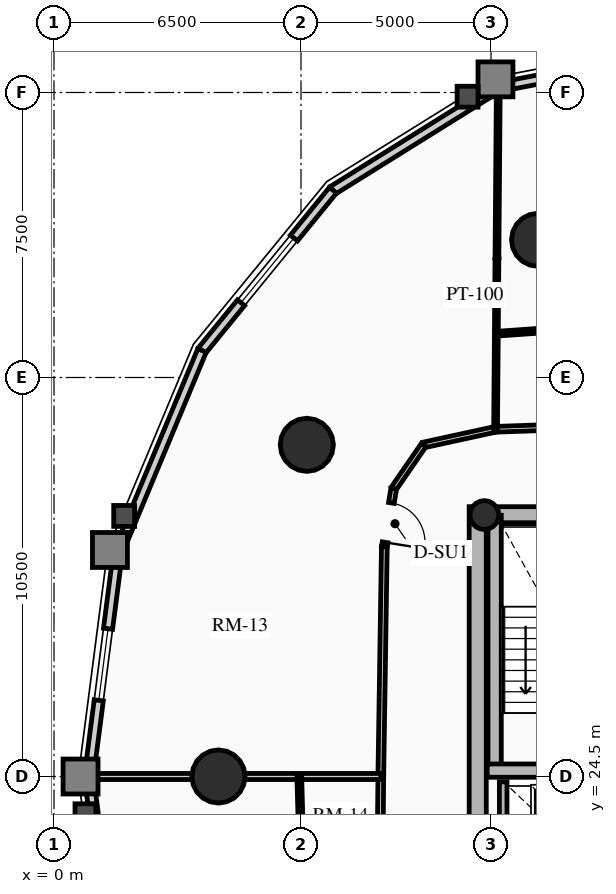
"""IFC4 building model, lengths in metres.
Left out: names, types, materials, properties, quantities, classifications, styles, units other than length and angle.
Written with IfcOpenShell. Run it as: python <this file> out.ifc"""

import sys

from ifc_helpers import new_model, si_unit, direction, frame, frame_2d, origin, origin_2d, place, context, subcontext, project, spatial, rectangle, circle, hollow_circle, extrude, source, transform, mapped, element, fill, save


model = new_model("IFC4")
c1 = context("Model", 3, precision=1e-05, world=origin(), true_north=direction((0.0, 1.0)))
c2 = subcontext(c1, "Body", "Model", "MODEL_VIEW")
j1 = project(units=[si_unit("LENGTHUNIT", "METRE"), si_unit("PLANEANGLEUNIT", "RADIAN")], contexts=[c1])
p1 = place(None, origin())
s1 = spatial("IfcSite", under=j1, at=p1, CompositionType="ELEMENT")
p2 = place(p1, origin())
s2 = spatial("IfcBuilding", under=s1, at=p2, CompositionType="ELEMENT")
p3 = place(p2, frame((0.0, 0.0, 129.16)))
s3 = spatial("IfcBuildingStorey", under=s2, at=p3, CompositionType="ELEMENT", Elevation=129.16)
p4 = place(p3, frame((11.15, 17.4, 0.0), z_axis=(0.0, 0.0, 1.0), x_axis=(0.0, 1.0, 0.0)))
e1 = element("IfcWall", 1, at=p4, inside=s3, PredefinedType="SHEAR", context=c2, shape_type="SweptSolid", body=[
    extrude(rectangle(XDim=14.2, YDim=0.45, at=frame_2d((7.1, 0.0))), origin(), (0.0, 0.0, 1.0), 3.72),
])
p5 = place(p3, frame((11.15, 31.375, 0.0), z_axis=(0.0, 0.0, 1.0), x_axis=(1.0, 0.0, 0.0)))
e2 = element("IfcWall", 2, at=p5, inside=s3, PredefinedType="SHEAR", context=c2, shape_type="SweptSolid", body=[
    extrude(rectangle(XDim=10.7, YDim=0.45, at=frame_2d((5.35, 0.0))), origin(), (0.0, 0.0, 1.0), 3.72),
])
m1 = source(origin(), c2, "Body", "SweptSolid", [
    extrude(rectangle(XDim=1.5, YDim=2.02, at=frame_2d((0.75, 1.01))), frame((0.0, 0.235, 0.0), z_axis=(0.0, -1.0, 0.0), x_axis=(1.0, 0.0, 0.0)), (0.0, 0.0, 1.0), 0.47),
])
p6 = place(p5, frame((4.6, 0.0, 0.0)))
e3 = element("IfcOpeningElement", 3, at=p6, cuts=e2, PredefinedType="OPENING", context=c2, shape_type="MappedRepresentation", body=[
    mapped(m1, transform((0.0, 0.0, 0.0), x_axis=(1.0, 0.0, 0.0), y_axis=(0.0, 1.0, 0.0), z_axis=(0.0, 0.0, 1.0), scale=1.0)),
])
p7 = place(p3, frame((11.595, 24.655, 0.0), z_axis=(0.0, 0.0, 1.0), x_axis=(0.0, 1.0, 0.0)))
e4 = element("IfcWall", 4, at=p7, inside=s3, PredefinedType="SHEAR", context=c2, shape_type="SweptSolid", body=[
    extrude(rectangle(XDim=6.72, YDim=0.35, at=frame_2d((3.36, 0.0))), origin(), (0.0, 0.0, 1.0), 3.72),
])
p8 = place(p3, frame((11.4, 24.655, 0.0), z_axis=(0.0, 0.0, 1.0), x_axis=(1.0, 0.0, 0.0)))
e5 = element("IfcWall", 5, at=p8, inside=s3, PredefinedType="SHEAR", context=c2, shape_type="SweptSolid", body=[
    extrude(rectangle(XDim=3.285, YDim=0.35, at=frame_2d((1.643, 0.0))), origin(), (0.0, 0.0, 1.0), 3.72),
])
p9 = place(p3, frame((11.325, 31.38, 0.0), z_axis=(0.0, 0.0, 1.0), x_axis=(1.0, 0.0, 0.0)))
e6 = element("IfcColumn", 6, at=p9, inside=s3, PredefinedType="COLUMN", context=c2, shape_type="SweptSolid", body=[
    extrude(hollow_circle(Radius=0.38, WallThickness=0.032, at=origin_2d()), origin(), (0.0, 0.0, 1.0), 3.72),
])
for number, where, z_axis, x_axis in (
    (7, (12.739, 38.623, 0.0), (0.0, 0.0, 1.0), (1.0, 0.0, 0.0)),
    (8, (6.653, 33.229, 0.0), (0.0, 0.0, 1.0), (1.0, 0.0, 0.0)),
    (9, (4.328, 24.5, 0.0), (0.0, 0.0, 1.0), (1.0, 0.0, 0.0)),
):
    element("IfcColumn", number, at=place(p3, frame(where, z_axis=z_axis, x_axis=x_axis)), inside=s3, PredefinedType="USERDEFINED", context=c2, shape_type="SweptSolid", body=[
        extrude(circle(Radius=0.7, at=origin_2d()), origin(), (0.0, 0.0, 1.0), 3.72),
    ])
p10 = place(p3, frame((11.685, 42.637, 0.0), z_axis=(0.0, 0.0, 1.0), x_axis=(0.981723785992, 0.190311344954, 0.0)))
e10 = element("IfcWall", 10, at=p10, inside=s3, PredefinedType="SOLIDWALL", context=c2, shape_type="SweptSolid", body=[
    extrude(rectangle(XDim=4.904, YDim=0.24, at=frame_2d((2.452, 0.0))), origin(), (0.0, 0.0, 1.0), 2.949),
])
m2 = source(origin(), c2, "Body", "SweptSolid", [
    extrude(rectangle(XDim=1.9, YDim=1.35, at=frame_2d((0.95, 0.675))), frame((0.0, 0.13, 0.0), z_axis=(0.0, -1.0, 0.0), x_axis=(1.0, 0.0, 0.0)), (0.0, 0.0, 1.0), 0.26),
])
p11 = place(p10, frame((1.502, 0.0, 0.65)))
e11 = element("IfcOpeningElement", 11, at=p11, cuts=e10, PredefinedType="OPENING", context=c2, shape_type="MappedRepresentation", body=[
    mapped(m2, transform((0.0, 0.0, 0.0), x_axis=(1.0, 0.0, 0.0), y_axis=(0.0, 1.0, 0.0), z_axis=(0.0, 0.0, 1.0), scale=1.0)),
])
p12 = place(p3, frame((7.342, 39.928, 0.0), z_axis=(0.0, 0.0, 1.0), x_axis=(0.848520380187, 0.529162701263, 0.0)))
e12 = element("IfcWall", 12, at=p12, inside=s3, PredefinedType="SOLIDWALL", context=c2, shape_type="SweptSolid", body=[
    extrude(rectangle(XDim=5.119, YDim=0.24, at=frame_2d((2.56, 0.0))), origin(), (0.0, 0.0, 1.0), 2.949),
])
p13 = place(p3, frame((3.895, 35.709, 0.0), z_axis=(0.0, 0.0, 1.0), x_axis=(0.632700781152, 0.77439635945, 0.0)))
e13 = element("IfcWall", 13, at=p13, inside=s3, PredefinedType="SOLIDWALL", context=c2, shape_type="SweptSolid", body=[
    extrude(rectangle(XDim=5.448, YDim=0.24, at=frame_2d((2.724, 0.0))), origin(), (0.0, 0.0, 1.0), 2.949),
])
m3 = source(origin(), c2, "Body", "SweptSolid", [
    extrude(rectangle(XDim=2.2, YDim=1.35, at=frame_2d((1.1, 0.675))), frame((0.0, 0.13, 0.0), z_axis=(0.0, -1.0, 0.0), x_axis=(1.0, 0.0, 0.0)), (0.0, 0.0, 1.0), 0.26),
])
p14 = place(p13, frame((1.624, 0.0, 0.65)))
e14 = element("IfcOpeningElement", 14, at=p14, cuts=e13, PredefinedType="OPENING", context=c2, shape_type="MappedRepresentation", body=[
    mapped(m3, transform((0.0, 0.0, 0.0), x_axis=(1.0, 0.0, 0.0), y_axis=(0.0, 1.0, 0.0), z_axis=(0.0, 0.0, 1.0), scale=1.0)),
])
p15 = place(p3, frame((1.682, 30.393, 0.0), z_axis=(0.0, 0.0, 1.0), x_axis=(0.384344417632, 0.923189779317, 0.0)))
e15 = element("IfcWall", 15, at=p15, inside=s3, PredefinedType="SOLIDWALL", context=c2, shape_type="SweptSolid", body=[
    extrude(rectangle(XDim=5.758, YDim=0.24, at=frame_2d((2.879, 0.0))), origin(), (0.0, 0.0, 1.0), 2.949),
])
p16 = place(p3, frame((0.919, 24.5, 0.0), z_axis=(0.0, 0.0, 1.0), x_axis=(0.128351991996, 0.991728675672, 0.0)))
e16 = element("IfcWall", 16, at=p16, inside=s3, PredefinedType="SOLIDWALL", context=c2, shape_type="SweptSolid", body=[
    extrude(rectangle(XDim=5.942, YDim=0.24, at=frame_2d((2.971, 0.0))), origin(), (0.0, 0.0, 1.0), 2.949),
])
p17 = place(p16, frame((2.021, 0.0, 0.65)))
e17 = element("IfcOpeningElement", 17, at=p17, cuts=e16, PredefinedType="OPENING", context=c2, shape_type="MappedRepresentation", body=[
    mapped(m2, transform((0.0, 0.0, 0.0), x_axis=(1.0, 0.0, 0.0), y_axis=(0.0, 1.0, 0.0), z_axis=(0.0, 0.0, 1.0), scale=1.0)),
])
p18 = place(p3, frame((1.682, 18.607, 0.0), z_axis=(0.0, 0.0, 1.0), x_axis=(-0.128351991996, 0.991728675672, 0.0)))
e18 = element("IfcWall", 18, at=p18, inside=s3, PredefinedType="SOLIDWALL", context=c2, shape_type="SweptSolid", body=[
    extrude(rectangle(XDim=5.942, YDim=0.24, at=frame_2d((2.971, 0.0))), origin(), (0.0, 0.0, 1.0), 2.949),
])
p19 = place(p3, frame((11.82, 21.92, 0.0), z_axis=(0.0, 0.0, 1.0), x_axis=(0.0, 1.0, 0.0)))
e19 = element("IfcWall", 19, at=p19, inside=s3, PredefinedType="SHEAR", context=c2, shape_type="SweptSolid", body=[
    extrude(rectangle(XDim=2.44, YDim=0.2, at=frame_2d((1.22, 0.0))), origin(), (0.0, 0.0, 1.0), 3.72),
])
p20 = place(p3, frame((18.143, 33.86, 0.0), z_axis=(0.0, 0.0, 1.0), x_axis=(-0.999419208319, -0.034077060363, 0.0)))
e20 = element("IfcWall", 20, at=p20, inside=s3, PredefinedType="PARTITIONING", context=c2, shape_type="SweptSolid", body=[
    extrude(rectangle(XDim=6.527, YDim=0.15, at=frame_2d((3.263, 0.0))), origin(), (0.0, 0.0, 1.0), 2.995),
])
p21 = place(p3, frame((11.62, 33.637, 0.0), z_axis=(0.0, 0.0, 1.0), x_axis=(-0.97702579435, -0.213121085711, 0.0)))
e21 = element("IfcWall", 21, at=p21, inside=s3, PredefinedType="PARTITIONING", context=c2, shape_type="SweptSolid", body=[
    extrude(rectangle(XDim=1.935, YDim=0.15, at=frame_2d((0.967, 0.0))), origin(), (0.0, 0.0, 1.0), 2.995),
])
p22 = place(p3, frame((9.729, 33.225, 0.0), z_axis=(0.0, 0.0, 1.0), x_axis=(-0.567183649484, -0.82359134755, 0.0)))
e22 = element("IfcWall", 22, at=p22, inside=s3, PredefinedType="PARTITIONING", context=c2, shape_type="SweptSolid", body=[
    extrude(rectangle(XDim=1.392, YDim=0.15, at=frame_2d((0.696, 0.0))), origin(), (0.0, 0.0, 1.0), 2.995),
])
p23 = place(p3, frame((8.94, 32.078, 0.0), z_axis=(0.0, 0.0, 1.0), x_axis=(-0.159148467753, -0.98725466077, 0.0)))
e23 = element("IfcWall", 23, at=p23, inside=s3, PredefinedType="PARTITIONING", context=c2, shape_type="SweptSolid", body=[
    extrude(rectangle(XDim=1.554, YDim=0.15, at=frame_2d((0.777, 0.0))), origin(), (0.0, 0.0, 1.0), 2.995),
])
m4 = source(origin(), c2, "Body", "SweptSolid", [
    extrude(rectangle(XDim=1.05, YDim=2.015, at=frame_2d((0.525, 1.007))), frame((0.0, 0.085, 0.0), z_axis=(0.0, -1.0, 0.0), x_axis=(1.0, 0.0, 0.0)), (0.0, 0.0, 1.0), 0.17),
])
p24 = place(p23, frame((0.384, 0.0, 0.0)))
e24 = element("IfcOpeningElement", 24, at=p24, cuts=e23, PredefinedType="OPENING", context=c2, shape_type="MappedRepresentation", body=[
    mapped(m4, transform((0.0, 0.0, 0.0), x_axis=(1.0, 0.0, 0.0), y_axis=(0.0, 1.0, 0.0), z_axis=(0.0, 0.0, 1.0), scale=1.0)),
])
p25 = place(p3, frame((8.693, 30.544, 0.0), z_axis=(0.0, 0.0, 1.0), x_axis=(-0.015307007986, -0.99988284089, 0.0)))
e25 = element("IfcWall", 25, at=p25, inside=s3, PredefinedType="PARTITIONING", context=c2, shape_type="SweptSolid", body=[
    extrude(rectangle(XDim=6.045, YDim=0.15, at=frame_2d((3.022, 0.0))), origin(), (0.0, 0.0, 1.0), 3.425),
])
p26 = place(p3, frame((8.6, 24.5, 0.0), z_axis=(0.0, 0.0, 1.0), x_axis=(-0.010023665349, -0.999949761805, 0.0)))
e26 = element("IfcWall", 26, at=p26, inside=s3, PredefinedType="PARTITIONING", context=c2, shape_type="SweptSolid", body=[
    extrude(rectangle(XDim=6.162, YDim=0.15, at=frame_2d((3.081, 0.0))), origin(), (0.0, 0.0, 1.0), 2.995),
])
p27 = place(p3, frame((11.62, 33.637, 0.0), z_axis=(0.0, 0.0, 1.0), x_axis=(0.007965167065, 0.999968277554, 0.0)))
e27 = element("IfcWall", 27, at=p27, inside=s3, PredefinedType="MOVABLE", context=c2, shape_type="SweptSolid", body=[
    extrude(rectangle(XDim=8.981, YDim=0.1, at=frame_2d((4.49, 0.0))), origin(), (0.0, 0.0, 1.0), 2.949),
])
p28 = place(p3, frame((8.6, 24.5, 0.0), z_axis=(0.0, 0.0, 1.0), x_axis=(-1.0, 0.0, 0.0)))
e28 = element("IfcWall", 28, at=p28, inside=s3, PredefinedType="PARTITIONING", context=c2, shape_type="SweptSolid", body=[
    extrude(rectangle(XDim=7.661, YDim=0.16, at=frame_2d((3.831, 0.0))), origin(), (0.0, 0.0, 1.0), 2.949),
])
p29 = place(p3, frame((17.683, 36.573, 0.0), z_axis=(0.0, 0.0, 1.0), x_axis=(-0.997580369038, -0.069522710754, 0.0)))
e29 = element("IfcWall", 29, at=p29, inside=s3, PredefinedType="PARTITIONING", context=c2, shape_type="SweptSolid", body=[
    extrude(rectangle(XDim=6.058, YDim=0.125, at=frame_2d((3.029, 0.0))), origin(), (0.0, 0.0, 1.0), 2.995),
])
p30 = place(p3, frame((6.455, 24.5, 0.0), z_axis=(0.0, 0.0, 1.0), x_axis=(0.027753708707, -0.999614791634, 0.0)))
e30 = element("IfcWall", 30, at=p30, inside=s3, PredefinedType="PARTITIONING", context=c2, shape_type="SweptSolid", body=[
    extrude(rectangle(XDim=6.087, YDim=0.125, at=frame_2d((3.044, 0.0))), origin(), (0.0, 0.0, 1.0), 2.995),
])
m5 = source(origin(), c2, "Body", "SweptSolid", [
    extrude(rectangle(XDim=0.9, YDim=2.005, at=frame_2d((0.45, 1.002))), frame((0.0, 0.073, 0.0), z_axis=(0.0, -1.0, 0.0), x_axis=(1.0, 0.0, 0.0)), (0.0, 0.0, 1.0), 0.145),
])
p31 = place(p30, frame((2.594, 0.0, 0.0)))
e31 = element("IfcOpeningElement", 31, at=p31, cuts=e30, PredefinedType="OPENING", context=c2, shape_type="MappedRepresentation", body=[
    mapped(m5, transform((0.0, 0.0, 0.0), x_axis=(1.0, 0.0, 0.0), y_axis=(0.0, 1.0, 0.0), z_axis=(0.0, 0.0, 1.0), scale=1.0)),
])
m6 = source(origin(), c2, "Body", "SweptSolid", [
    extrude(rectangle(XDim=2.2, YDim=1.35, at=frame_2d((1.1, 0.675))), frame((0.0, 0.03, 0.0), z_axis=(0.0, -1.0, 0.0), x_axis=(1.0, 0.0, 0.0)), (0.0, 0.0, 1.0), 0.06),
])
p32 = place(p14, origin())
e32 = element("IfcWindow", 32, at=p32, inside=s3, PartitioningType="DOUBLE_PANEL_VERTICAL", PredefinedType="WINDOW", context=c2, shape_type="MappedRepresentation", body=[
    mapped(m6, transform((0.0, 0.0, 0.0), x_axis=(1.0, 0.0, 0.0), y_axis=(0.0, 1.0, 0.0), z_axis=(0.0, 0.0, 1.0), scale=1.0)),
])
fill(e14, e32)
m7 = source(origin(), c2, "Body", "SweptSolid", [
    extrude(rectangle(XDim=1.9, YDim=1.35, at=frame_2d((0.95, 0.675))), frame((0.0, 0.03, 0.0), z_axis=(0.0, -1.0, 0.0), x_axis=(1.0, 0.0, 0.0)), (0.0, 0.0, 1.0), 0.06),
])
p33 = place(p17, origin())
e33 = element("IfcWindow", 33, at=p33, inside=s3, PartitioningType="DOUBLE_PANEL_VERTICAL", PredefinedType="WINDOW", context=c2, shape_type="MappedRepresentation", body=[
    mapped(m7, transform((0.0, 0.0, 0.0), x_axis=(1.0, 0.0, 0.0), y_axis=(0.0, 1.0, 0.0), z_axis=(0.0, 0.0, 1.0), scale=1.0)),
])
fill(e17, e33)
m8 = source(origin(), c2, "Body", "SweptSolid", [
    extrude(rectangle(XDim=1.05, YDim=2.015, at=frame_2d((0.525, 1.007))), frame((0.0, 0.025, 0.0), z_axis=(0.0, -1.0, 0.0), x_axis=(1.0, 0.0, 0.0)), (0.0, 0.0, 1.0), 0.05),
])
p34 = place(p24, origin())
e34 = element("IfcDoor", 34, at=p34, inside=s3, OperationType="SINGLE_SWING_RIGHT", PredefinedType="DOOR", context=c2, shape_type="MappedRepresentation", body=[
    mapped(m8, transform((0.0, 0.0, 0.0), x_axis=(1.0, 0.0, 0.0), y_axis=(0.0, 1.0, 0.0), z_axis=(0.0, 0.0, 1.0), scale=1.0)),
])
fill(e24, e34)
save(model, sys.argv[1])
